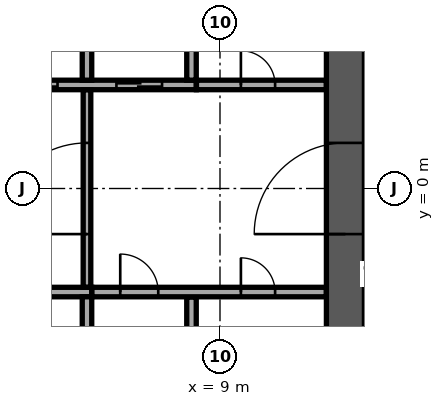
"""IFC4 building model, lengths in metres.
Left out: names, types, materials, properties, quantities, classifications, styles, units other than length and angle.
Written with IfcOpenShell. Run it as: python <this file> out.ifc"""

import sys

from ifc_helpers import new_model, si_unit, direction, frame, frame_2d, origin, place, context, subcontext, project, spatial, rectangle, extrude, element, fill, save


model = new_model("IFC4")
c1 = context("Model", 3, precision=1e-05, world=origin(), true_north=direction((0.0, 1.0)))
c2 = subcontext(c1, "Body", "Model", "MODEL_VIEW")
j1 = project(units=[si_unit("LENGTHUNIT", "METRE"), si_unit("PLANEANGLEUNIT", "RADIAN")], contexts=[c1])
p1 = place(None, origin())
s1 = spatial("IfcSite", under=j1, at=p1, CompositionType="ELEMENT")
p2 = place(p1, origin())
s2 = spatial("IfcBuilding", under=s1, at=p2, CompositionType="ELEMENT")
p3 = place(p2, frame((0.0, 0.0, 163.7)))
s3 = spatial("IfcBuildingStorey", under=s2, at=p3, CompositionType="ELEMENT", Elevation=163.7)
p4 = place(p3, frame((12.3, -11.8, 0.0), z_axis=(0.0, 0.0, 1.0), x_axis=(0.0, 1.0, 0.0)))
e1 = element("IfcWall", 1, at=p4, inside=s3, PredefinedType="SHEAR", context=c2, shape_type="SweptSolid", body=[
    extrude(rectangle(XDim=23.6, YDim=1.0, at=frame_2d((11.8, 0.0))), origin(), (0.0, 0.0, 1.0), 3.6),
])
p5 = place(p4, frame((10.6, 0.0, 0.0)))
e2 = element("IfcOpeningElement", 2, at=p5, cuts=e1, PredefinedType="OPENING", context=c2, shape_type="SweptSolid", body=[
    extrude(rectangle(XDim=2.4, YDim=2.4, at=frame_2d((1.2, 1.2))), frame((0.0, 0.51, 0.0), z_axis=(0.0, -1.0, 0.0), x_axis=(1.0, 0.0, 0.0)), (0.0, 0.0, 1.0), 1.02),
])
p6 = place(p3, frame((-8.375, 2.725, 0.0), z_axis=(0.0, 0.0, 1.0), x_axis=(1.0, 0.0, 0.0)))
e3 = element("IfcWall", 3, at=p6, inside=s3, PredefinedType="SOLIDWALL", context=c2, shape_type="SweptSolid", body=[
    extrude(rectangle(XDim=16.75, YDim=0.25, at=frame_2d((8.375, 0.0))), origin(), (0.0, 0.0, 1.0), 3.6),
])
p7 = place(p6, frame((0.9, 0.0, 0.0)))
e4 = element("IfcOpeningElement", 4, at=p7, cuts=e3, PredefinedType="OPENING", context=c2, shape_type="SweptSolid", body=[
    extrude(rectangle(XDim=1.2, YDim=2.1, at=frame_2d((0.6, 1.05))), frame((0.0, 0.135, 0.0), z_axis=(0.0, -1.0, 0.0), x_axis=(1.0, 0.0, 0.0)), (0.0, 0.0, 1.0), 0.27),
])
p8 = place(p6, frame((3.65, 0.0, 0.0)))
e5 = element("IfcOpeningElement", 5, at=p8, cuts=e3, PredefinedType="OPENING", context=c2, shape_type="SweptSolid", body=[
    extrude(rectangle(XDim=1.2, YDim=2.1, at=frame_2d((0.6, 1.05))), frame((0.0, 0.135, 0.0), z_axis=(0.0, -1.0, 0.0), x_axis=(1.0, 0.0, 0.0)), (0.0, 0.0, 1.0), 0.27),
])
p9 = place(p6, frame((6.4, 0.0, 0.0)))
e6 = element("IfcOpeningElement", 6, at=p9, cuts=e3, PredefinedType="OPENING", context=c2, shape_type="SweptSolid", body=[
    extrude(rectangle(XDim=1.2, YDim=2.1, at=frame_2d((0.6, 1.05))), frame((0.0, 0.135, 0.0), z_axis=(0.0, -1.0, 0.0), x_axis=(1.0, 0.0, 0.0)), (0.0, 0.0, 1.0), 0.27),
])
p10 = place(p6, frame((9.15, 0.0, 0.0)))
e7 = element("IfcOpeningElement", 7, at=p10, cuts=e3, PredefinedType="OPENING", context=c2, shape_type="SweptSolid", body=[
    extrude(rectangle(XDim=1.2, YDim=2.1, at=frame_2d((0.6, 1.05))), frame((0.0, 0.135, 0.0), z_axis=(0.0, -1.0, 0.0), x_axis=(1.0, 0.0, 0.0)), (0.0, 0.0, 1.0), 0.27),
])
p11 = place(p6, frame((11.9, 0.0, 0.0)))
e8 = element("IfcOpeningElement", 8, at=p11, cuts=e3, PredefinedType="OPENING", context=c2, shape_type="SweptSolid", body=[
    extrude(rectangle(XDim=1.2, YDim=2.1, at=frame_2d((0.6, 1.05))), frame((0.0, 0.135, 0.0), z_axis=(0.0, -1.0, 0.0), x_axis=(1.0, 0.0, 0.0)), (0.0, 0.0, 1.0), 0.27),
])
p12 = place(p6, frame((14.65, 0.0, 0.0)))
e9 = element("IfcOpeningElement", 9, at=p12, cuts=e3, PredefinedType="OPENING", context=c2, shape_type="SweptSolid", body=[
    extrude(rectangle(XDim=1.2, YDim=2.1, at=frame_2d((0.6, 1.05))), frame((0.0, 0.135, 0.0), z_axis=(0.0, -1.0, 0.0), x_axis=(1.0, 0.0, 0.0)), (0.0, 0.0, 1.0), 0.27),
])
for number, where, z_axis, x_axis in (
    (10, (5.5, 2.85, 0.0), (0.0, 0.0, 1.0), (0.0, 1.0, 0.0)),
    (11, (8.25, 2.85, 0.0), (0.0, 0.0, 1.0), (0.0, 1.0, 0.0)),
):
    element("IfcWall", number, at=place(p3, frame(where, z_axis=z_axis, x_axis=x_axis)), inside=s3, PredefinedType="SOLIDWALL", context=c2, shape_type="SweptSolid", body=[
        extrude(rectangle(XDim=2.7, YDim=0.25, at=frame_2d((1.35, 0.0))), origin(), (0.0, 0.0, 1.0), 3.6),
    ])
p13 = place(p3, frame((-2.875, -2.725, 0.0), z_axis=(0.0, 0.0, 1.0), x_axis=(1.0, 0.0, 0.0)))
e12 = element("IfcWall", 12, at=p13, inside=s3, PredefinedType="SOLIDWALL", context=c2, shape_type="SweptSolid", body=[
    extrude(rectangle(XDim=8.5, YDim=0.25, at=frame_2d((4.25, 0.0))), origin(), (0.0, 0.0, 1.0), 3.6),
])
p14 = place(p3, frame((5.5, -5.55, 0.0), z_axis=(0.0, 0.0, 1.0), x_axis=(0.0, 1.0, 0.0)))
e13 = element("IfcWall", 13, at=p14, inside=s3, PredefinedType="SOLIDWALL", context=c2, shape_type="SweptSolid", body=[
    extrude(rectangle(XDim=2.7, YDim=0.25, at=frame_2d((1.35, 0.0))), origin(), (0.0, 0.0, 1.0), 3.6),
])
p15 = place(p3, frame((8.25, -5.545, 0.0), z_axis=(0.0, 0.0, 1.0), x_axis=(0.0, 1.0, 0.0)))
e14 = element("IfcWall", 14, at=p15, inside=s3, PredefinedType="PARTITIONING", context=c2, shape_type="SweptSolid", body=[
    extrude(rectangle(XDim=2.69, YDim=0.25, at=frame_2d((1.345, 0.0))), origin(), (0.0, 0.0, 1.0), 3.6),
])
p16 = place(p3, frame((5.63, -2.725, 0.0), z_axis=(0.0, 0.0, 1.0), x_axis=(1.0, 0.0, 0.0)))
e15 = element("IfcWall", 15, at=p16, inside=s3, PredefinedType="PARTITIONING", context=c2, shape_type="SweptSolid", body=[
    extrude(rectangle(XDim=6.165, YDim=0.25, at=frame_2d((3.083, 0.0))), origin(), (0.0, 0.0, 1.0), 3.6),
])
p17 = place(p16, frame((0.745, 0.0, 0.0)))
e16 = element("IfcOpeningElement", 16, at=p17, cuts=e15, PredefinedType="OPENING", context=c2, shape_type="SweptSolid", body=[
    extrude(rectangle(XDim=1.0, YDim=2.1, at=frame_2d((0.5, 1.05))), frame((0.0, 0.135, 0.0), z_axis=(0.0, -1.0, 0.0), x_axis=(1.0, 0.0, 0.0)), (0.0, 0.0, 1.0), 0.27),
])
p18 = place(p16, frame((3.92, 0.0, 0.0)))
e17 = element("IfcOpeningElement", 17, at=p18, cuts=e15, PredefinedType="OPENING", context=c2, shape_type="SweptSolid", body=[
    extrude(rectangle(XDim=0.9, YDim=2.1, at=frame_2d((0.45, 1.05))), frame((0.0, 0.135, 0.0), z_axis=(0.0, -1.0, 0.0), x_axis=(1.0, 0.0, 0.0)), (0.0, 0.0, 1.0), 0.27),
])
p19 = place(p3, frame((5.5, -2.595, 0.0), z_axis=(0.0, 0.0, 1.0), x_axis=(0.0, 1.0, 0.0)))
e18 = element("IfcWall", 18, at=p19, inside=s3, PredefinedType="PARTITIONING", context=c2, shape_type="SweptSolid", body=[
    extrude(rectangle(XDim=5.19, YDim=0.2, at=frame_2d((2.595, 0.0))), origin(), (0.0, 0.0, 1.0), 3.6),
])
p20 = place(p19, frame((1.395, 0.0, 0.0)))
e19 = element("IfcOpeningElement", 19, at=p20, cuts=e18, PredefinedType="OPENING", context=c2, shape_type="SweptSolid", body=[
    extrude(rectangle(XDim=2.4, YDim=2.4, at=frame_2d((1.2, 1.2))), frame((0.0, 0.11, 0.0), z_axis=(0.0, -1.0, 0.0), x_axis=(1.0, 0.0, 0.0)), (0.0, 0.0, 1.0), 0.22),
])
p21 = place(p3, frame((8.38, 2.725, 0.0), z_axis=(0.0, 0.0, 1.0), x_axis=(1.0, 0.0, 0.0)))
e20 = element("IfcWall", 20, at=p21, inside=s3, PredefinedType="PARTITIONING", context=c2, shape_type="SweptSolid", body=[
    extrude(rectangle(XDim=3.415, YDim=0.25, at=frame_2d((1.708, 0.0))), origin(), (0.0, 0.0, 1.0), 3.6),
])
p22 = place(p21, frame((1.17, 0.0, 0.0)))
e21 = element("IfcOpeningElement", 21, at=p22, cuts=e20, PredefinedType="OPENING", context=c2, shape_type="SweptSolid", body=[
    extrude(rectangle(XDim=0.9, YDim=2.1, at=frame_2d((0.45, 1.05))), frame((0.0, 0.135, 0.0), z_axis=(0.0, -1.0, 0.0), x_axis=(1.0, 0.0, 0.0)), (0.0, 0.0, 1.0), 0.27),
])
p23 = place(p3, frame((36.533, 0.245, 0.0), z_axis=(0.0, 0.0, 1.0), x_axis=(-0.58778579343, 0.809016601215, 0.0)))
e22 = element("IfcWall", 22, at=p23, inside=s3, PredefinedType="STANDARD", context=c2, shape_type="SweptSolid", body=[
    extrude(rectangle(XDim=42.176, YDim=0.6, at=frame_2d((21.088, 0.0))), origin(), (0.0, 0.0, 1.0), 3.6),
])
p24 = place(p23, frame((1.138, 0.0, 0.9)))
e23 = element("IfcOpeningElement", 23, at=p24, cuts=e22, PredefinedType="OPENING", context=c2, shape_type="SweptSolid", body=[
    extrude(rectangle(XDim=2.3, YDim=2.1, at=frame_2d((1.15, 1.05))), frame((0.0, 0.31, 0.0), z_axis=(0.0, -1.0, 0.0), x_axis=(1.0, 0.0, 0.0)), (0.0, 0.0, 1.0), 0.62),
])
p25 = place(p23, frame((5.776, 0.0, 0.9)))
e24 = element("IfcOpeningElement", 24, at=p25, cuts=e22, PredefinedType="OPENING", context=c2, shape_type="SweptSolid", body=[
    extrude(rectangle(XDim=2.3, YDim=2.1, at=frame_2d((1.15, 1.05))), frame((0.0, 0.31, 0.0), z_axis=(0.0, -1.0, 0.0), x_axis=(1.0, 0.0, 0.0)), (0.0, 0.0, 1.0), 0.62),
])
p26 = place(p23, frame((10.476, 0.0, 0.9)))
e25 = element("IfcOpeningElement", 25, at=p26, cuts=e22, PredefinedType="OPENING", context=c2, shape_type="SweptSolid", body=[
    extrude(rectangle(XDim=2.3, YDim=2.1, at=frame_2d((1.15, 1.05))), frame((0.0, 0.31, 0.0), z_axis=(0.0, -1.0, 0.0), x_axis=(1.0, 0.0, 0.0)), (0.0, 0.0, 1.0), 0.62),
])
p27 = place(p23, frame((15.176, 0.0, 0.9)))
e26 = element("IfcOpeningElement", 26, at=p27, cuts=e22, PredefinedType="OPENING", context=c2, shape_type="SweptSolid", body=[
    extrude(rectangle(XDim=2.3, YDim=2.1, at=frame_2d((1.15, 1.05))), frame((0.0, 0.31, 0.0), z_axis=(0.0, -1.0, 0.0), x_axis=(1.0, 0.0, 0.0)), (0.0, 0.0, 1.0), 0.62),
])
p28 = place(p23, frame((19.876, 0.0, 0.9)))
e27 = element("IfcOpeningElement", 27, at=p28, cuts=e22, PredefinedType="OPENING", context=c2, shape_type="SweptSolid", body=[
    extrude(rectangle(XDim=2.3, YDim=2.1, at=frame_2d((1.15, 1.05))), frame((0.0, 0.31, 0.0), z_axis=(0.0, -1.0, 0.0), x_axis=(1.0, 0.0, 0.0)), (0.0, 0.0, 1.0), 0.62),
])
p29 = place(p23, frame((24.576, 0.0, 0.9)))
e28 = element("IfcOpeningElement", 28, at=p29, cuts=e22, PredefinedType="OPENING", context=c2, shape_type="SweptSolid", body=[
    extrude(rectangle(XDim=2.3, YDim=2.1, at=frame_2d((1.15, 1.05))), frame((0.0, 0.31, 0.0), z_axis=(0.0, -1.0, 0.0), x_axis=(1.0, 0.0, 0.0)), (0.0, 0.0, 1.0), 0.62),
])
p30 = place(p23, frame((29.276, 0.0, 0.9)))
e29 = element("IfcOpeningElement", 29, at=p30, cuts=e22, PredefinedType="OPENING", context=c2, shape_type="SweptSolid", body=[
    extrude(rectangle(XDim=2.3, YDim=2.1, at=frame_2d((1.15, 1.05))), frame((0.0, 0.31, 0.0), z_axis=(0.0, -1.0, 0.0), x_axis=(1.0, 0.0, 0.0)), (0.0, 0.0, 1.0), 0.62),
])
p31 = place(p23, frame((33.976, 0.0, 0.9)))
e30 = element("IfcOpeningElement", 30, at=p31, cuts=e22, PredefinedType="OPENING", context=c2, shape_type="SweptSolid", body=[
    extrude(rectangle(XDim=2.3, YDim=2.1, at=frame_2d((1.15, 1.05))), frame((0.0, 0.31, 0.0), z_axis=(0.0, -1.0, 0.0), x_axis=(1.0, 0.0, 0.0)), (0.0, 0.0, 1.0), 0.62),
])
p32 = place(p23, frame((38.676, 0.0, 0.9)))
e31 = element("IfcOpeningElement", 31, at=p32, cuts=e22, PredefinedType="OPENING", context=c2, shape_type="SweptSolid", body=[
    extrude(rectangle(XDim=2.3, YDim=2.1, at=frame_2d((1.15, 1.05))), frame((0.0, 0.31, 0.0), z_axis=(0.0, -1.0, 0.0), x_axis=(1.0, 0.0, 0.0)), (0.0, 0.0, 1.0), 0.62),
])
p33 = place(p3, frame((9.681, 24.652, 0.0), z_axis=(0.0, 0.0, 1.0), x_axis=(0.58776328895, -0.809032951222, 0.0)))
e32 = element("IfcWall", 32, at=p33, inside=s3, PredefinedType="PARTITIONING", context=c2, shape_type="SweptSolid", body=[
    extrude(rectangle(XDim=28.583, YDim=0.15, at=frame_2d((14.291, 0.0))), origin(), (0.0, 0.0, 1.0), 3.15),
])
p34 = place(p33, frame((12.256, 0.0, 0.0)))
e33 = element("IfcOpeningElement", 33, at=p34, cuts=e32, PredefinedType="OPENING", context=c2, shape_type="SweptSolid", body=[
    extrude(rectangle(XDim=1.0, YDim=2.1, at=frame_2d((0.5, 1.05))), frame((0.0, 0.085, 0.0), z_axis=(0.0, -1.0, 0.0), x_axis=(1.0, 0.0, 0.0)), (0.0, 0.0, 1.0), 0.17),
])
p35 = place(p5, origin())
e34 = element("IfcDoor", 34, at=p35, inside=s3, OperationType="SINGLE_SWING_LEFT", PredefinedType="DOOR", context=c2, shape_type="SweptSolid", body=[
    extrude(rectangle(XDim=2.4, YDim=2.4, at=frame_2d((1.2, 1.2))), frame((0.0, 0.025, 0.0), z_axis=(0.0, -1.0, 0.0), x_axis=(1.0, 0.0, 0.0)), (0.0, 0.0, 1.0), 0.05),
])
fill(e2, e34)
p36 = place(p11, origin())
e35 = element("IfcDoor", 35, at=p36, inside=s3, OperationType="DOUBLE_DOOR_SLIDING", PredefinedType="DOOR", context=c2, shape_type="SweptSolid", body=[
    extrude(rectangle(XDim=1.2, YDim=2.1, at=frame_2d((0.6, 1.05))), frame((0.0, 0.025, 0.0), z_axis=(0.0, -1.0, 0.0), x_axis=(1.0, 0.0, 0.0)), (0.0, 0.0, 1.0), 0.05),
])
fill(e8, e35)
p37 = place(p12, origin())
e36 = element("IfcDoor", 36, at=p37, inside=s3, OperationType="DOUBLE_DOOR_SLIDING", PredefinedType="DOOR", context=c2, shape_type="SweptSolid", body=[
    extrude(rectangle(XDim=1.2, YDim=2.1, at=frame_2d((0.6, 1.05))), frame((0.0, 0.025, 0.0), z_axis=(0.0, -1.0, 0.0), x_axis=(1.0, 0.0, 0.0)), (0.0, 0.0, 1.0), 0.05),
])
fill(e9, e36)
p38 = place(p17, origin())
e37 = element("IfcDoor", 37, at=p38, inside=s3, OperationType="SINGLE_SWING_LEFT", PredefinedType="DOOR", context=c2, shape_type="SweptSolid", body=[
    extrude(rectangle(XDim=1.0, YDim=2.1, at=frame_2d((0.5, 1.05))), frame((0.0, 0.025, 0.0), z_axis=(0.0, -1.0, 0.0), x_axis=(1.0, 0.0, 0.0)), (0.0, 0.0, 1.0), 0.05),
])
fill(e16, e37)
p39 = place(p22, origin())
e38 = element("IfcDoor", 38, at=p39, inside=s3, OperationType="SINGLE_SWING_LEFT", PredefinedType="DOOR", context=c2, shape_type="SweptSolid", body=[
    extrude(rectangle(XDim=0.9, YDim=2.1, at=frame_2d((0.45, 1.05))), frame((0.0, 0.025, 0.0), z_axis=(0.0, -1.0, 0.0), x_axis=(1.0, 0.0, 0.0)), (0.0, 0.0, 1.0), 0.05),
])
fill(e21, e38)
p40 = place(p18, origin())
e39 = element("IfcDoor", 39, at=p40, inside=s3, OperationType="SINGLE_SWING_LEFT", PredefinedType="DOOR", context=c2, shape_type="SweptSolid", body=[
    extrude(rectangle(XDim=0.9, YDim=2.1, at=frame_2d((0.45, 1.05))), frame((0.0, 0.025, 0.0), z_axis=(0.0, -1.0, 0.0), x_axis=(1.0, 0.0, 0.0)), (0.0, 0.0, 1.0), 0.05),
])
fill(e17, e39)
p41 = place(p20, origin())
e40 = element("IfcDoor", 40, at=p41, inside=s3, OperationType="SINGLE_SWING_LEFT", PredefinedType="DOOR", context=c2, shape_type="SweptSolid", body=[
    extrude(rectangle(XDim=2.4, YDim=2.4, at=frame_2d((1.2, 1.2))), frame((0.0, 0.025, 0.0), z_axis=(0.0, -1.0, 0.0), x_axis=(1.0, 0.0, 0.0)), (0.0, 0.0, 1.0), 0.05),
])
fill(e19, e40)
save(model, sys.argv[1])
